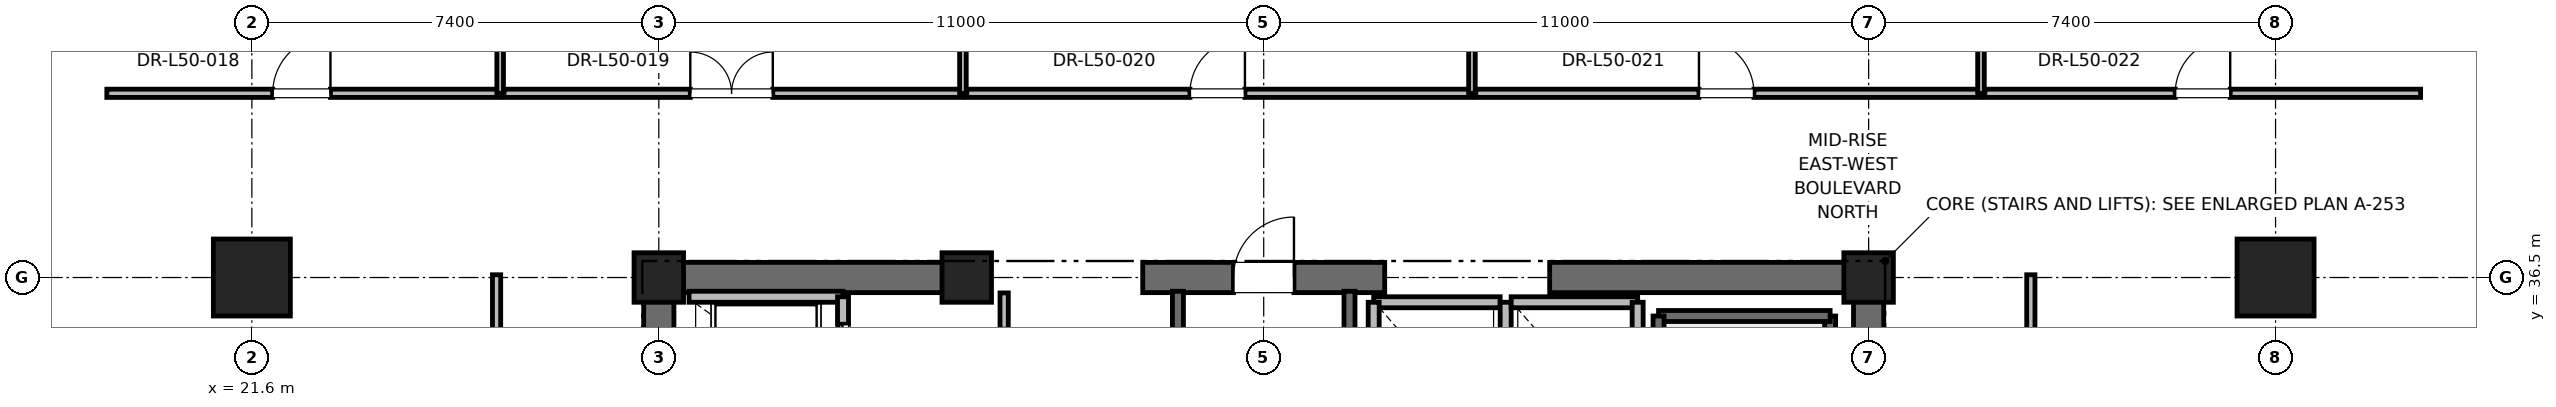
"""IFC4 building model, lengths in metres.
Left out: names, types, materials, properties, quantities, classifications, styles, units other than length and angle.
Written with IfcOpenShell. Run it as: python <this file> out.ifc"""

import sys

from ifc_helpers import new_model, si_unit, direction, frame, frame_2d, origin, origin_2d, place, context, subcontext, project, spatial, rectangle, extrude, element, fill, save


model = new_model("IFC4")
c1 = context("Model", 3, precision=1e-05, world=origin(), true_north=direction((0.0, 1.0)))
c2 = subcontext(c1, "Body", "Model", "MODEL_VIEW")
j1 = project(units=[si_unit("LENGTHUNIT", "METRE"), si_unit("PLANEANGLEUNIT", "RADIAN")], contexts=[c1])
p1 = place(None, origin())
s1 = spatial("IfcSite", under=j1, at=p1, CompositionType="ELEMENT")
p2 = place(p1, origin())
s2 = spatial("IfcBuilding", under=s1, at=p2, CompositionType="ELEMENT")
p3 = place(p2, frame((0.0, 0.0, 217.2)))
s3 = spatial("IfcBuildingStorey", under=s2, at=p3, CompositionType="ELEMENT", Elevation=217.2)
for number, where, z_axis, x_axis in (
    (1, (21.6, 36.5, 0.0), (0.0, 0.0, 1.0), (1.0, 0.0, 0.0)),
    (2, (58.4, 36.5, 0.0), (0.0, 0.0, 1.0), (1.0, 0.0, 0.0)),
):
    element("IfcColumn", number, at=place(p3, frame(where, z_axis=z_axis, x_axis=x_axis)), inside=s3, PredefinedType="COLUMN", context=c2, shape_type="SweptSolid", body=[
        extrude(rectangle(XDim=1.4, YDim=1.4, at=origin_2d()), origin(), (0.0, 0.0, 1.0), 4.0),
    ])
for number, where, z_axis, x_axis in (
    (3, (29.0, 36.5, 0.0), (0.0, 0.0, 1.0), (1.0, 0.0, 0.0)),
    (4, (51.0, 36.5, 0.0), (0.0, 0.0, 1.0), (1.0, 0.0, 0.0)),
    (5, (34.6, 36.5, 0.0), (0.0, 0.0, 1.0), (1.0, 0.0, 0.0)),
):
    element("IfcColumn", number, at=place(p3, frame(where, z_axis=z_axis, x_axis=x_axis)), inside=s3, PredefinedType="PILASTER", context=c2, shape_type="SweptSolid", body=[
        extrude(rectangle(XDim=0.9, YDim=0.9, at=origin_2d()), origin(), (0.0, 0.0, 1.0), 4.0),
    ])
p4 = place(p3, frame((29.0, 36.5, 0.0), z_axis=(0.0, 0.0, 1.0), x_axis=(1.0, 0.0, 0.0)))
e6 = element("IfcWall", 6, at=p4, inside=s3, PredefinedType="SHEAR", context=c2, shape_type="SweptSolid", body=[
    extrude(rectangle(XDim=5.8, YDim=0.55, at=frame_2d((2.9, 0.0))), origin(), (0.0, 0.0, 1.0), 3.775),
])
p5 = place(p3, frame((37.8, 36.5, 0.0), z_axis=(0.0, 0.0, 1.0), x_axis=(1.0, 0.0, 0.0)))
e7 = element("IfcWall", 7, at=p5, inside=s3, PredefinedType="SHEAR", context=c2, shape_type="SweptSolid", body=[
    extrude(rectangle(XDim=4.4, YDim=0.55, at=frame_2d((2.2, 0.0))), origin(), (0.0, 0.0, 1.0), 3.775),
])
p6 = place(p5, frame((1.65, 0.0, 0.0)))
e8 = element("IfcOpeningElement", 8, at=p6, cuts=e7, PredefinedType="OPENING", context=c2, shape_type="SweptSolid", body=[
    extrude(rectangle(XDim=1.1, YDim=2.15, at=frame_2d((0.55, 1.075))), frame((0.0, 0.275, 0.0), z_axis=(0.0, -1.0, 0.0), x_axis=(1.0, 0.0, 0.0)), (0.0, 0.0, 1.0), 0.55),
])
for number, where, z_axis, x_axis in (
    (9, (45.2, 36.5, 0.0), (0.0, 0.0, 1.0), (1.0, 0.0, 0.0)),
    (10, (29.0, 30.7, 0.0), (0.0, 0.0, 1.0), (0.0, 1.0, 0.0)),
):
    element("IfcWall", number, at=place(p3, frame(where, z_axis=z_axis, x_axis=x_axis)), inside=s3, PredefinedType="SHEAR", context=c2, shape_type="SweptSolid", body=[
        extrude(rectangle(XDim=5.8, YDim=0.55, at=frame_2d((2.9, 0.0))), origin(), (0.0, 0.0, 1.0), 3.775),
    ])
p7 = place(p3, frame((51.0, 27.7, 0.0), z_axis=(0.0, 0.0, 1.0), x_axis=(0.0, 1.0, 0.0)))
e11 = element("IfcWall", 11, at=p7, inside=s3, PredefinedType="SHEAR", context=c2, shape_type="SweptSolid", body=[
    extrude(rectangle(XDim=8.8, YDim=0.55, at=frame_2d((4.4, 0.0))), origin(), (0.0, 0.0, 1.0), 3.775),
])
p8 = place(p3, frame((50.3, 27.65, 0.0), z_axis=(0.0, 0.0, 1.0), x_axis=(0.0, 1.0, 0.0)))
e12 = element("IfcWall", 12, at=p8, inside=s3, PredefinedType="SOLIDWALL", context=c2, shape_type="SweptSolid", body=[
    extrude(rectangle(XDim=8.15, YDim=0.2, at=frame_2d((4.075, 0.0))), origin(), (0.0, 0.0, 1.0), 3.775),
])
p9 = place(p3, frame((47.18, 35.8, 0.0), z_axis=(0.0, 0.0, 1.0), x_axis=(1.0, 0.0, 0.0)))
e13 = element("IfcWall", 13, at=p9, inside=s3, PredefinedType="SOLIDWALL", context=c2, shape_type="SweptSolid", body=[
    extrude(rectangle(XDim=3.12, YDim=0.2, at=frame_2d((1.56, 0.0))), origin(), (0.0, 0.0, 1.0), 3.775),
])
p10 = place(p3, frame((47.18, 27.62, 0.0), z_axis=(0.0, 0.0, 1.0), x_axis=(0.0, 1.0, 0.0)))
e14 = element("IfcWall", 14, at=p10, inside=s3, PredefinedType="SOLIDWALL", context=c2, shape_type="SweptSolid", body=[
    extrude(rectangle(XDim=8.18, YDim=0.2, at=frame_2d((4.09, 0.0))), origin(), (0.0, 0.0, 1.0), 3.775),
])
p11 = place(p3, frame((38.44, 27.38, 0.0), z_axis=(0.0, 0.0, 1.0), x_axis=(0.0, 1.0, 0.0)))
e15 = element("IfcWall", 15, at=p11, inside=s3, PredefinedType="SOLIDWALL", context=c2, shape_type="SweptSolid", body=[
    extrude(rectangle(XDim=8.87, YDim=0.2, at=frame_2d((4.435, 0.0))), origin(), (0.0, 0.0, 1.0), 3.775),
])
p12 = place(p3, frame((41.56, 27.68, 0.0), z_axis=(0.0, 0.0, 1.0), x_axis=(0.0, 1.0, 0.0)))
e16 = element("IfcWall", 16, at=p12, inside=s3, PredefinedType="SOLIDWALL", context=c2, shape_type="SweptSolid", body=[
    extrude(rectangle(XDim=8.57, YDim=0.2, at=frame_2d((4.285, 0.0))), origin(), (0.0, 0.0, 1.0), 3.775),
])
p13 = place(p3, frame((32.35, 36.15, 0.0), z_axis=(0.0, 0.0, 1.0), x_axis=(-1.0, 0.0, 0.0)))
e17 = element("IfcWall", 17, at=p13, inside=s3, PredefinedType="SOLIDWALL", context=c2, shape_type="SweptSolid", body=[
    extrude(rectangle(XDim=2.8, YDim=0.2, at=frame_2d((1.4, 0.0))), origin(), (0.0, 0.0, 1.0), 3.062),
])
p14 = place(p3, frame((32.35, 34.05, 0.0), z_axis=(0.0, 0.0, 1.0), x_axis=(0.0, 1.0, 0.0)))
e18 = element("IfcWall", 18, at=p14, inside=s3, PredefinedType="SOLIDWALL", context=c2, shape_type="SweptSolid", body=[
    extrude(rectangle(XDim=2.1, YDim=0.2, at=frame_2d((1.05, 0.0))), origin(), (0.0, 0.0, 1.0), 3.775),
])
p15 = place(p14, frame((0.5, 0.0, 0.0)))
e19 = element("IfcOpeningElement", 19, at=p15, cuts=e18, PredefinedType="OPENING", context=c2, shape_type="SweptSolid", body=[
    extrude(rectangle(XDim=1.1, YDim=2.2, at=frame_2d((0.55, 1.1))), frame((0.0, 0.1, 0.0), z_axis=(0.0, -1.0, 0.0), x_axis=(1.0, 0.0, 0.0)), (0.0, 0.0, 1.0), 0.2),
])
p16 = place(p3, frame((44.3, 36.05, 0.0), z_axis=(0.0, 0.0, 1.0), x_axis=(-1.0, 0.0, 0.0)))
e20 = element("IfcWall", 20, at=p16, inside=s3, PredefinedType="SOLIDWALL", context=c2, shape_type="SweptSolid", body=[
    extrude(rectangle(XDim=2.3, YDim=0.2, at=frame_2d((1.15, 0.0))), origin(), (0.0, 0.0, 1.0), 2.755),
])
for number, where, z_axis, x_axis in (
    (21, (42.0, 36.05, 0.0), (0.0, 0.0, 1.0), (0.0, -1.0, 0.0)),
    (22, (44.4, 33.45, 0.0), (0.0, 0.0, 1.0), (0.0, 1.0, 0.0)),
):
    element("IfcWall", number, at=place(p3, frame(where, z_axis=z_axis, x_axis=x_axis)), inside=s3, PredefinedType="SOLIDWALL", context=c2, shape_type="SweptSolid", body=[
        extrude(rectangle(XDim=2.6, YDim=0.2, at=frame_2d((1.3, 0.0))), origin(), (0.0, 0.0, 1.0), 2.755),
    ])
p17 = place(p3, frame((46.8, 36.05, 0.0), z_axis=(0.0, 0.0, 1.0), x_axis=(-1.0, 0.0, 0.0)))
e23 = element("IfcWall", 23, at=p17, inside=s3, PredefinedType="SOLIDWALL", context=c2, shape_type="SweptSolid", body=[
    extrude(rectangle(XDim=2.3, YDim=0.2, at=frame_2d((1.15, 0.0))), origin(), (0.0, 0.0, 1.0), 2.755),
])
p18 = place(p3, frame((46.8, 33.45, 0.0), z_axis=(0.0, 0.0, 1.0), x_axis=(0.0, 1.0, 0.0)))
e24 = element("IfcWall", 24, at=p18, inside=s3, PredefinedType="SOLIDWALL", context=c2, shape_type="SweptSolid", body=[
    extrude(rectangle(XDim=2.6, YDim=0.2, at=frame_2d((1.3, 0.0))), origin(), (0.0, 0.0, 1.0), 3.775),
])
p19 = place(p3, frame((35.28, 33.95, 0.0), z_axis=(0.0, 0.0, 1.0), x_axis=(0.0, 1.0, 0.0)))
e25 = element("IfcWall", 25, at=p19, inside=s3, PredefinedType="PARTITIONING", context=c2, shape_type="SweptSolid", body=[
    extrude(rectangle(XDim=2.27, YDim=0.15, at=frame_2d((1.135, 0.0))), origin(), (0.0, 0.0, 1.0), 2.755),
])
p20 = place(p19, frame((0.66, 0.0, 0.0)))
e26 = element("IfcOpeningElement", 26, at=p20, cuts=e25, PredefinedType="OPENING", context=c2, shape_type="SweptSolid", body=[
    extrude(rectangle(XDim=0.95, YDim=2.15, at=frame_2d((0.475, 1.075))), frame((0.0, 0.075, 0.0), z_axis=(0.0, -1.0, 0.0), x_axis=(1.0, 0.0, 0.0)), (0.0, 0.0, 1.0), 0.15),
])
p21 = place(p3, frame((18.963, 39.85, 0.0), z_axis=(0.0, 0.0, 1.0), x_axis=(1.0, 0.0, 0.0)))
e27 = element("IfcWall", 27, at=p21, inside=s3, PredefinedType="PARTITIONING", context=c2, shape_type="SweptSolid", body=[
    extrude(rectangle(XDim=7.153, YDim=0.15, at=frame_2d((3.576, 0.0))), origin(), (0.0, 0.0, 1.0), 2.85),
])
p22 = place(p21, frame((3.016, 0.0, 0.0)))
e28 = element("IfcOpeningElement", 28, at=p22, cuts=e27, PredefinedType="OPENING", context=c2, shape_type="SweptSolid", body=[
    extrude(rectangle(XDim=1.05, YDim=2.2, at=frame_2d((0.525, 1.1))), frame((0.0, 0.075, 0.0), z_axis=(0.0, -1.0, 0.0), x_axis=(1.0, 0.0, 0.0)), (0.0, 0.0, 1.0), 0.15),
])
p23 = place(p3, frame((26.115, 39.85, 0.0), z_axis=(0.0, 0.0, 1.0), x_axis=(0.0, 1.0, 0.0)))
e29 = element("IfcWall", 29, at=p23, inside=s3, PredefinedType="PARTITIONING", context=c2, shape_type="SweptSolid", body=[
    extrude(rectangle(XDim=9.564, YDim=0.12, at=frame_2d((4.782, 0.0))), origin(), (0.0, 0.0, 1.0), 2.85),
])
p24 = place(p3, frame((26.185, 39.85, 0.0), z_axis=(0.0, 0.0, 1.0), x_axis=(1.0, 0.0, 0.0)))
e30 = element("IfcWall", 30, at=p24, inside=s3, PredefinedType="PARTITIONING", context=c2, shape_type="SweptSolid", body=[
    extrude(rectangle(XDim=8.345, YDim=0.15, at=frame_2d((4.172, 0.0))), origin(), (0.0, 0.0, 1.0), 2.85),
])
p25 = place(p24, frame((3.387, 0.0, 0.0)))
e31 = element("IfcOpeningElement", 31, at=p25, cuts=e30, PredefinedType="OPENING", context=c2, shape_type="SweptSolid", body=[
    extrude(rectangle(XDim=1.5, YDim=2.25, at=frame_2d((0.75, 1.125))), frame((0.0, 0.075, 0.0), z_axis=(0.0, -1.0, 0.0), x_axis=(1.0, 0.0, 0.0)), (0.0, 0.0, 1.0), 0.15),
])
p26 = place(p3, frame((34.53, 39.85, 0.0), z_axis=(0.0, 0.0, 1.0), x_axis=(0.0, 1.0, 0.0)))
e32 = element("IfcWall", 32, at=p26, inside=s3, PredefinedType="PARTITIONING", context=c2, shape_type="SweptSolid", body=[
    extrude(rectangle(XDim=9.564, YDim=0.12, at=frame_2d((4.782, 0.0))), origin(), (0.0, 0.0, 1.0), 2.405),
])
p27 = place(p3, frame((34.6, 39.85, 0.0), z_axis=(0.0, 0.0, 1.0), x_axis=(1.0, 0.0, 0.0)))
e33 = element("IfcWall", 33, at=p27, inside=s3, PredefinedType="PARTITIONING", context=c2, shape_type="SweptSolid", body=[
    extrude(rectangle(XDim=9.186, YDim=0.15, at=frame_2d((4.593, 0.0))), origin(), (0.0, 0.0, 1.0), 2.85),
])
p28 = place(p27, frame((4.058, 0.0, 0.0)))
e34 = element("IfcOpeningElement", 34, at=p28, cuts=e33, PredefinedType="OPENING", context=c2, shape_type="SweptSolid", body=[
    extrude(rectangle(XDim=1.0, YDim=2.15, at=frame_2d((0.5, 1.075))), frame((0.0, 0.075, 0.0), z_axis=(0.0, -1.0, 0.0), x_axis=(1.0, 0.0, 0.0)), (0.0, 0.0, 1.0), 0.15),
])
p29 = place(p3, frame((43.787, 39.85, 0.0), z_axis=(0.0, 0.0, 1.0), x_axis=(0.0, 1.0, 0.0)))
e35 = element("IfcWall", 35, at=p29, inside=s3, PredefinedType="PARTITIONING", context=c2, shape_type="SweptSolid", body=[
    extrude(rectangle(XDim=9.564, YDim=0.12, at=frame_2d((4.782, 0.0))), origin(), (0.0, 0.0, 1.0), 2.405),
])
p30 = place(p3, frame((43.857, 39.85, 0.0), z_axis=(0.0, 0.0, 1.0), x_axis=(1.0, 0.0, 0.0)))
e36 = element("IfcWall", 36, at=p30, inside=s3, PredefinedType="PARTITIONING", context=c2, shape_type="SweptSolid", body=[
    extrude(rectangle(XDim=9.187, YDim=0.15, at=frame_2d((4.593, 0.0))), origin(), (0.0, 0.0, 1.0), 2.85),
])
p31 = place(p30, frame((4.058, 0.0, 0.0)))
e37 = element("IfcOpeningElement", 37, at=p31, cuts=e36, PredefinedType="OPENING", context=c2, shape_type="SweptSolid", body=[
    extrude(rectangle(XDim=1.0, YDim=2.15, at=frame_2d((0.5, 1.075))), frame((0.0, 0.075, 0.0), z_axis=(0.0, -1.0, 0.0), x_axis=(1.0, 0.0, 0.0)), (0.0, 0.0, 1.0), 0.15),
])
p32 = place(p3, frame((53.043, 39.85, 0.0), z_axis=(0.0, 0.0, 1.0), x_axis=(0.0, 1.0, 0.0)))
e38 = element("IfcWall", 38, at=p32, inside=s3, PredefinedType="PARTITIONING", context=c2, shape_type="SweptSolid", body=[
    extrude(rectangle(XDim=9.564, YDim=0.12, at=frame_2d((4.782, 0.0))), origin(), (0.0, 0.0, 1.0), 2.85),
])
p33 = place(p3, frame((53.113, 39.85, 0.0), z_axis=(0.0, 0.0, 1.0), x_axis=(1.0, 0.0, 0.0)))
e39 = element("IfcWall", 39, at=p33, inside=s3, PredefinedType="PARTITIONING", context=c2, shape_type="SweptSolid", body=[
    extrude(rectangle(XDim=7.924, YDim=0.15, at=frame_2d((3.962, 0.0))), origin(), (0.0, 0.0, 1.0), 2.85),
])
p34 = place(p33, frame((3.462, 0.0, 0.0)))
e40 = element("IfcOpeningElement", 40, at=p34, cuts=e39, PredefinedType="OPENING", context=c2, shape_type="SweptSolid", body=[
    extrude(rectangle(XDim=1.0, YDim=2.15, at=frame_2d((0.5, 1.075))), frame((0.0, 0.075, 0.0), z_axis=(0.0, -1.0, 0.0), x_axis=(1.0, 0.0, 0.0)), (0.0, 0.0, 1.0), 0.15),
])
p35 = place(p3, frame((26.05, 26.122, 0.0), z_axis=(0.0, 0.0, 1.0), x_axis=(0.0, 1.0, 0.0)))
e41 = element("IfcWall", 41, at=p35, inside=s3, PredefinedType="PARTITIONING", context=c2, shape_type="SweptSolid", body=[
    extrude(rectangle(XDim=10.428, YDim=0.15, at=frame_2d((5.214, 0.0))), origin(), (0.0, 0.0, 1.0), 2.85),
])
p36 = place(p35, frame((4.639, 0.0, 0.0)))
e42 = element("IfcOpeningElement", 42, at=p36, cuts=e41, PredefinedType="OPENING", context=c2, shape_type="SweptSolid", body=[
    extrude(rectangle(XDim=1.0, YDim=2.15, at=frame_2d((0.5, 1.075))), frame((0.0, 0.075, 0.0), z_axis=(0.0, -1.0, 0.0), x_axis=(1.0, 0.0, 0.0)), (0.0, 0.0, 1.0), 0.15),
])
p37 = place(p3, frame((53.95, 29.018, 0.0), z_axis=(0.0, 0.0, 1.0), x_axis=(0.0, 1.0, 0.0)))
e43 = element("IfcWall", 43, at=p37, inside=s3, PredefinedType="PARTITIONING", context=c2, shape_type="SweptSolid", body=[
    extrude(rectangle(XDim=7.532, YDim=0.15, at=frame_2d((3.766, 0.0))), origin(), (0.0, 0.0, 1.0), 2.85),
])
p38 = place(p37, frame((3.191, 0.0, 0.0)))
e44 = element("IfcOpeningElement", 44, at=p38, cuts=e43, PredefinedType="OPENING", context=c2, shape_type="SweptSolid", body=[
    extrude(rectangle(XDim=1.0, YDim=2.15, at=frame_2d((0.5, 1.075))), frame((0.0, 0.075, 0.0), z_axis=(0.0, -1.0, 0.0), x_axis=(1.0, 0.0, 0.0)), (0.0, 0.0, 1.0), 0.15),
])
p39 = place(p6, origin())
e45 = element("IfcDoor", 45, at=p39, inside=s3, OperationType="SINGLE_SWING_RIGHT", PredefinedType="DOOR", context=c2, shape_type="SweptSolid", body=[
    extrude(rectangle(XDim=1.1, YDim=2.15, at=frame_2d((0.55, 1.075))), frame((0.0, 0.025, 0.0), z_axis=(0.0, -1.0, 0.0), x_axis=(1.0, 0.0, 0.0)), (0.0, 0.0, 1.0), 0.05),
])
fill(e8, e45)
p40 = place(p15, origin())
e46 = element("IfcDoor", 46, at=p40, inside=s3, OperationType="SLIDING_TO_RIGHT", PredefinedType="DOOR", context=c2, shape_type="SweptSolid", body=[
    extrude(rectangle(XDim=1.1, YDim=2.2, at=frame_2d((0.55, 1.1))), frame((0.0, 0.025, 0.0), z_axis=(0.0, -1.0, 0.0), x_axis=(1.0, 0.0, 0.0)), (0.0, 0.0, 1.0), 0.05),
])
fill(e19, e46)
p41 = place(p22, origin())
e47 = element("IfcDoor", 47, at=p41, inside=s3, OperationType="SINGLE_SWING_RIGHT", PredefinedType="DOOR", context=c2, shape_type="SweptSolid", body=[
    extrude(rectangle(XDim=1.05, YDim=2.2, at=frame_2d((0.525, 1.1))), frame((0.0, 0.025, 0.0), z_axis=(0.0, -1.0, 0.0), x_axis=(1.0, 0.0, 0.0)), (0.0, 0.0, 1.0), 0.05),
])
fill(e28, e47)
p42 = place(p25, origin())
e48 = element("IfcDoor", 48, at=p42, inside=s3, OperationType="DOUBLE_DOOR_SINGLE_SWING", PredefinedType="DOOR", context=c2, shape_type="SweptSolid", body=[
    extrude(rectangle(XDim=1.5, YDim=2.25, at=frame_2d((0.75, 1.125))), frame((0.0, 0.025, 0.0), z_axis=(0.0, -1.0, 0.0), x_axis=(1.0, 0.0, 0.0)), (0.0, 0.0, 1.0), 0.05),
])
fill(e31, e48)
p43 = place(p28, origin())
e49 = element("IfcDoor", 49, at=p43, inside=s3, OperationType="SINGLE_SWING_RIGHT", PredefinedType="DOOR", context=c2, shape_type="SweptSolid", body=[
    extrude(rectangle(XDim=1.0, YDim=2.15, at=frame_2d((0.5, 1.075))), frame((0.0, 0.025, 0.0), z_axis=(0.0, -1.0, 0.0), x_axis=(1.0, 0.0, 0.0)), (0.0, 0.0, 1.0), 0.05),
])
fill(e34, e49)
p44 = place(p31, origin())
e50 = element("IfcDoor", 50, at=p44, inside=s3, OperationType="SINGLE_SWING_LEFT", PredefinedType="DOOR", context=c2, shape_type="SweptSolid", body=[
    extrude(rectangle(XDim=1.0, YDim=2.15, at=frame_2d((0.5, 1.075))), frame((0.0, 0.025, 0.0), z_axis=(0.0, -1.0, 0.0), x_axis=(1.0, 0.0, 0.0)), (0.0, 0.0, 1.0), 0.05),
])
fill(e37, e50)
p45 = place(p34, origin())
e51 = element("IfcDoor", 51, at=p45, inside=s3, OperationType="SINGLE_SWING_RIGHT", PredefinedType="DOOR", context=c2, shape_type="SweptSolid", body=[
    extrude(rectangle(XDim=1.0, YDim=2.15, at=frame_2d((0.5, 1.075))), frame((0.0, 0.025, 0.0), z_axis=(0.0, -1.0, 0.0), x_axis=(1.0, 0.0, 0.0)), (0.0, 0.0, 1.0), 0.05),
])
fill(e40, e51)
save(model, sys.argv[1])
